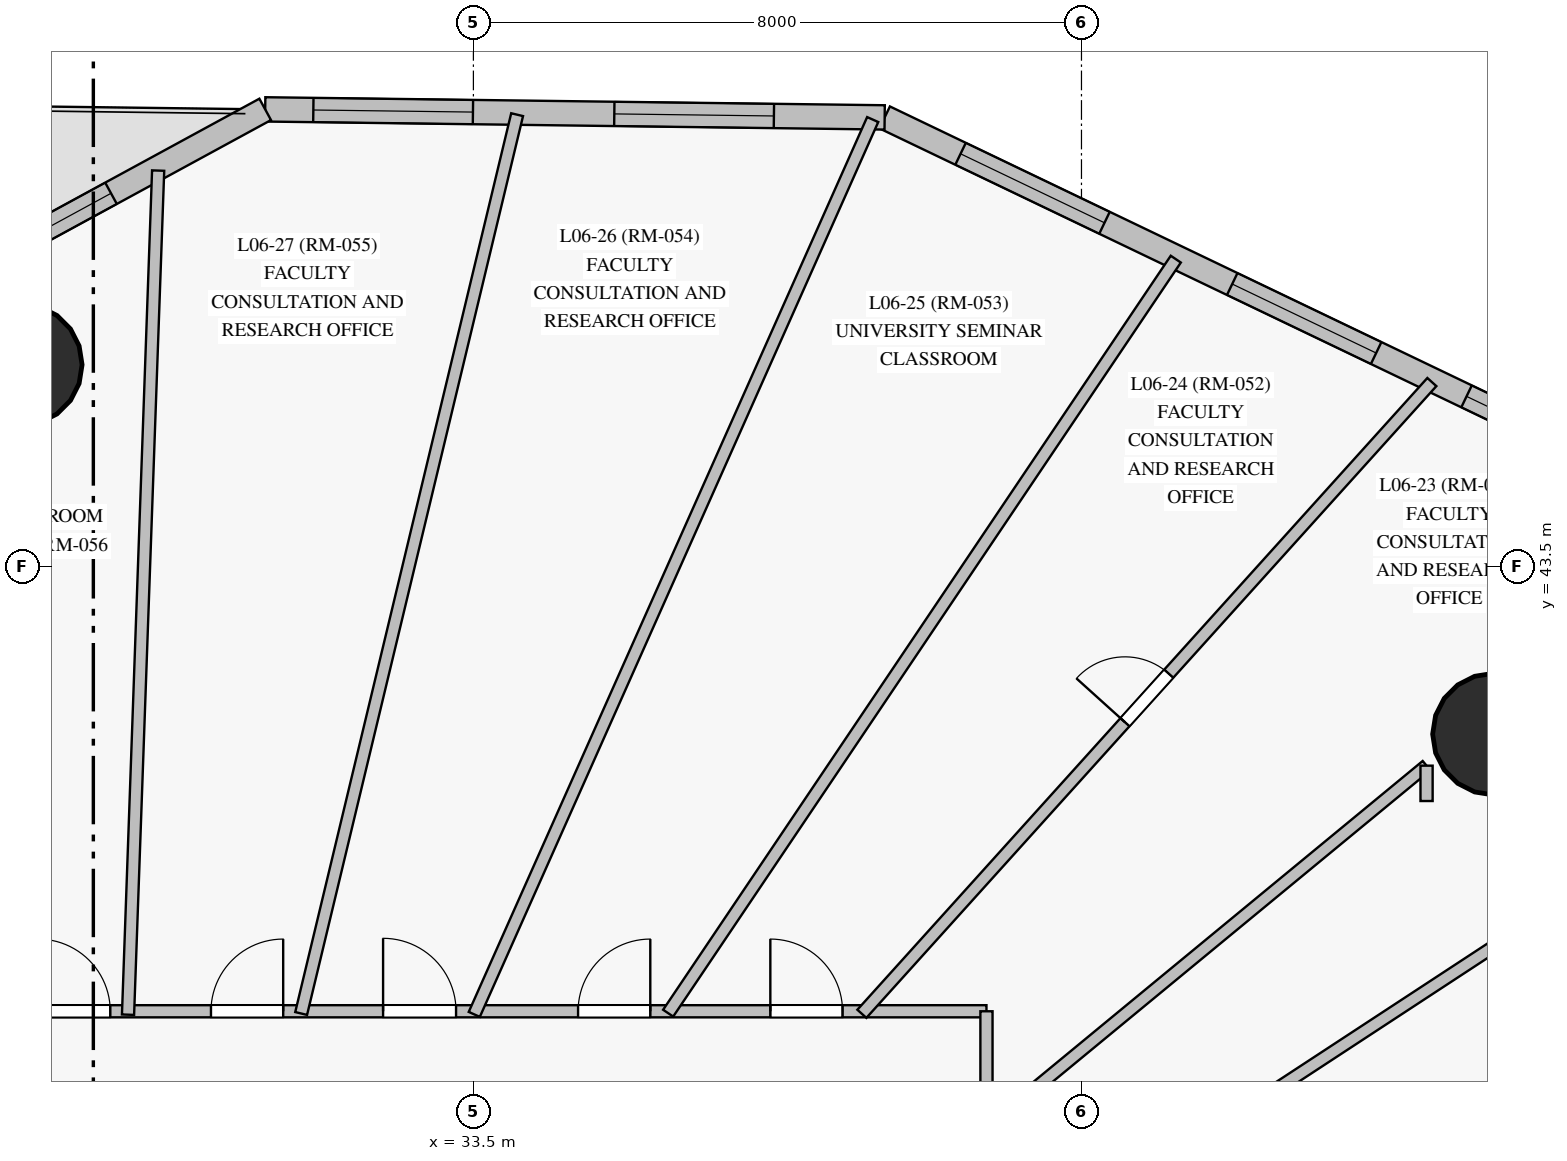
"""IFC4 building model, lengths in metres.
Left out: names, types, materials, properties, quantities, classifications, styles, units other than length and angle.
Written with IfcOpenShell. Run it as: python <this file> out.ifc"""

import sys

from ifc_helpers import new_model, si_unit, direction, frame, frame_2d, origin, origin_with_axes, origin_2d, place, context, subcontext, project, spatial, rectangle, circle, extrude, source, transform, mapped, element, fill, save


model = new_model("IFC4")
c1 = context("Model", 3, precision=1e-05, world=origin(), true_north=direction((0.0, 1.0)))
c2 = subcontext(c1, "Body", "Model", "MODEL_VIEW")
j1 = project(units=[si_unit("LENGTHUNIT", "METRE"), si_unit("PLANEANGLEUNIT", "RADIAN")], contexts=[c1])
p1 = place(None, origin())
s1 = spatial("IfcSite", under=j1, at=p1, CompositionType="ELEMENT")
p2 = place(p1, origin())
s2 = spatial("IfcBuilding", under=s1, at=p2, CompositionType="ELEMENT")
p3 = place(p2, frame((0.0, 0.0, 26.5)))
s3 = spatial("IfcBuildingStorey", under=s2, at=p3, CompositionType="ELEMENT", Elevation=26.5)
m1 = source(origin_with_axes(), c2, "Body", "SweptSolid", [
    extrude(circle(Radius=0.8, at=origin_2d()), origin(), (0.0, 0.0, 1.0), 3.6),
])
for number, where, z_axis, x_axis in (
    (1, (46.92, 41.296, 0.0), (0.0, 0.0, 1.0), (1.0, 0.0, 0.0)),
    (2, (27.552, 46.156, 0.0), (0.0, 0.0, 1.0), (1.0, 0.0, 0.0)),
):
    element("IfcColumn", number, at=place(p3, frame(where, z_axis=z_axis, x_axis=x_axis)), inside=s3, PredefinedType="COLUMN", context=c2, shape_type="MappedRepresentation", body=[
        mapped(m1, transform((0.0, 0.0, 0.0), scale=1.0)),
    ])
p4 = place(p3, frame((48.697, 44.718, 0.0), z_axis=(0.0, 0.0, 1.0), x_axis=(-0.901740587255, 0.432277588242, 0.0)))
e3 = element("IfcWall", 3, at=p4, inside=s3, PredefinedType="SOLIDWALL", context=c2, shape_type="SweptSolid", body=[
    extrude(rectangle(XDim=10.853, YDim=0.32, at=frame_2d((5.426, 0.0))), origin(), (0.0, 0.0, 1.0), 3.35),
])
p5 = place(p4, frame((0.563, 0.0, 0.85)))
e4 = element("IfcOpeningElement", 4, at=p5, cuts=e3, PredefinedType="OPENING", context=c2, shape_type="SweptSolid", body=[
    extrude(rectangle(XDim=1.8, YDim=1.85, at=frame_2d((0.9, 0.925))), frame((0.0, 0.17, 0.0), z_axis=(0.0, -1.0, 0.0), x_axis=(1.0, 0.0, 0.0)), (0.0, 0.0, 1.0), 0.34),
])
p6 = place(p4, frame((3.682, 0.0, 0.85)))
e5 = element("IfcOpeningElement", 5, at=p6, cuts=e3, PredefinedType="OPENING", context=c2, shape_type="SweptSolid", body=[
    extrude(rectangle(XDim=2.1, YDim=1.95, at=frame_2d((1.05, 0.975))), frame((0.0, 0.17, 0.0), z_axis=(0.0, -1.0, 0.0), x_axis=(1.0, 0.0, 0.0)), (0.0, 0.0, 1.0), 0.34),
])
p7 = place(p4, frame((7.645, 0.0, 0.85)))
e6 = element("IfcOpeningElement", 6, at=p7, cuts=e3, PredefinedType="OPENING", context=c2, shape_type="SweptSolid", body=[
    extrude(rectangle(XDim=2.1, YDim=1.95, at=frame_2d((1.05, 0.975))), frame((0.0, 0.17, 0.0), z_axis=(0.0, -1.0, 0.0), x_axis=(1.0, 0.0, 0.0)), (0.0, 0.0, 1.0), 0.34),
])
p8 = place(p3, frame((38.911, 49.41, 0.0), z_axis=(0.0, 0.0, 1.0), x_axis=(-0.999916274404, 0.012940022483, 0.0)))
e7 = element("IfcWall", 7, at=p8, inside=s3, PredefinedType="SOLIDWALL", context=c2, shape_type="SweptSolid", body=[
    extrude(rectangle(XDim=8.151, YDim=0.32, at=frame_2d((4.075, 0.0))), origin(), (0.0, 0.0, 1.0), 3.35),
])
p9 = place(p8, frame((1.457, 0.0, 0.85)))
e8 = element("IfcOpeningElement", 8, at=p9, cuts=e7, PredefinedType="OPENING", context=c2, shape_type="SweptSolid", body=[
    extrude(rectangle(XDim=2.1, YDim=1.95, at=frame_2d((1.05, 0.975))), frame((0.0, 0.17, 0.0), z_axis=(0.0, -1.0, 0.0), x_axis=(1.0, 0.0, 0.0)), (0.0, 0.0, 1.0), 0.34),
])
p10 = place(p8, frame((5.417, 0.0, 0.85)))
e9 = element("IfcOpeningElement", 9, at=p10, cuts=e7, PredefinedType="OPENING", context=c2, shape_type="SweptSolid", body=[
    extrude(rectangle(XDim=2.1, YDim=1.95, at=frame_2d((1.05, 0.975))), frame((0.0, 0.17, 0.0), z_axis=(0.0, -1.0, 0.0), x_axis=(1.0, 0.0, 0.0)), (0.0, 0.0, 1.0), 0.34),
])
p11 = place(p3, frame((30.761, 49.515, 0.0), z_axis=(0.0, 0.0, 1.0), x_axis=(-0.878317970129, -0.478076922, 0.0)))
e10 = element("IfcWall", 10, at=p11, inside=s3, PredefinedType="SOLIDWALL", context=c2, shape_type="SweptSolid", body=[
    extrude(rectangle(XDim=25.977, YDim=0.32, at=frame_2d((12.989, 0.0))), origin(), (0.0, 0.0, 1.0), 3.35),
])
p12 = place(p11, frame((2.309, 0.0, 0.85)))
e11 = element("IfcOpeningElement", 11, at=p12, cuts=e10, PredefinedType="OPENING", context=c2, shape_type="SweptSolid", body=[
    extrude(rectangle(XDim=2.1, YDim=1.95, at=frame_2d((1.05, 0.975))), frame((0.0, 0.17, 0.0), z_axis=(0.0, -1.0, 0.0), x_axis=(1.0, 0.0, 0.0)), (0.0, 0.0, 1.0), 0.34),
])
p13 = place(p11, frame((6.998, 0.0, 0.85)))
e12 = element("IfcOpeningElement", 12, at=p13, cuts=e10, PredefinedType="OPENING", context=c2, shape_type="SweptSolid", body=[
    extrude(rectangle(XDim=2.1, YDim=1.95, at=frame_2d((1.05, 0.975))), frame((0.0, 0.17, 0.0), z_axis=(0.0, -1.0, 0.0), x_axis=(1.0, 0.0, 0.0)), (0.0, 0.0, 1.0), 0.34),
])
p14 = place(p11, frame((22.154, 0.0, 0.85)))
e13 = element("IfcOpeningElement", 13, at=p14, cuts=e10, PredefinedType="OPENING", context=c2, shape_type="SweptSolid", body=[
    extrude(rectangle(XDim=2.1, YDim=1.95, at=frame_2d((1.05, 0.975))), frame((0.0, 0.17, 0.0), z_axis=(0.0, -1.0, 0.0), x_axis=(1.0, 0.0, 0.0)), (0.0, 0.0, 1.0), 0.34),
])
p15 = place(p11, frame((12.464, 0.0, 0.0)))
e14 = element("IfcOpeningElement", 14, at=p15, cuts=e10, PredefinedType="OPENING", context=c2, shape_type="SweptSolid", body=[
    extrude(rectangle(XDim=1.05, YDim=2.12, at=frame_2d((0.525, 1.06))), frame((0.0, 0.17, 0.0), z_axis=(0.0, -1.0, 0.0), x_axis=(1.0, 0.0, 0.0)), (0.0, 0.0, 1.0), 0.34),
])
p16 = place(p3, frame((10.5, 37.65, 0.0), z_axis=(0.0, 0.0, 1.0), x_axis=(1.0, 0.0, 0.0)))
e15 = element("IfcWall", 15, at=p16, inside=s3, PredefinedType="PARTITIONING", context=c2, shape_type="SweptSolid", body=[
    extrude(rectangle(XDim=29.75, YDim=0.16, at=frame_2d((14.875, 0.0))), origin(), (0.0, 0.0, 1.0), 2.75),
])
p17 = place(p16, frame((26.906, 0.0, 0.0)))
e16 = element("IfcOpeningElement", 16, at=p17, cuts=e15, PredefinedType="OPENING", context=c2, shape_type="SweptSolid", body=[
    extrude(rectangle(XDim=0.95, YDim=2.15, at=frame_2d((0.475, 1.075))), frame((0.0, 0.09, 0.0), z_axis=(0.0, -1.0, 0.0), x_axis=(1.0, 0.0, 0.0)), (0.0, 0.0, 1.0), 0.18),
])
p18 = place(p16, frame((24.377, 0.0, 0.0)))
e17 = element("IfcOpeningElement", 17, at=p18, cuts=e15, PredefinedType="OPENING", context=c2, shape_type="SweptSolid", body=[
    extrude(rectangle(XDim=0.95, YDim=2.15, at=frame_2d((0.475, 1.075))), frame((0.0, 0.09, 0.0), z_axis=(0.0, -1.0, 0.0), x_axis=(1.0, 0.0, 0.0)), (0.0, 0.0, 1.0), 0.18),
])
p19 = place(p16, frame((21.812, 0.0, 0.0)))
e18 = element("IfcOpeningElement", 18, at=p19, cuts=e15, PredefinedType="OPENING", context=c2, shape_type="SweptSolid", body=[
    extrude(rectangle(XDim=0.96, YDim=2.15, at=frame_2d((0.48, 1.075))), frame((0.0, 0.09, 0.0), z_axis=(0.0, -1.0, 0.0), x_axis=(1.0, 0.0, 0.0)), (0.0, 0.0, 1.0), 0.18),
])
p20 = place(p16, frame((19.548, 0.0, 0.0)))
e19 = element("IfcOpeningElement", 19, at=p20, cuts=e15, PredefinedType="OPENING", context=c2, shape_type="SweptSolid", body=[
    extrude(rectangle(XDim=0.95, YDim=2.15, at=frame_2d((0.475, 1.075))), frame((0.0, 0.09, 0.0), z_axis=(0.0, -1.0, 0.0), x_axis=(1.0, 0.0, 0.0)), (0.0, 0.0, 1.0), 0.18),
])
p21 = place(p16, frame((17.272, 0.0, 0.0)))
e20 = element("IfcOpeningElement", 20, at=p21, cuts=e15, PredefinedType="OPENING", context=c2, shape_type="SweptSolid", body=[
    extrude(rectangle(XDim=0.95, YDim=2.15, at=frame_2d((0.475, 1.075))), frame((0.0, 0.09, 0.0), z_axis=(0.0, -1.0, 0.0), x_axis=(1.0, 0.0, 0.0)), (0.0, 0.0, 1.0), 0.18),
])
p22 = place(p16, frame((15.625, 0.0, 0.0)))
e21 = element("IfcOpeningElement", 21, at=p22, cuts=e15, PredefinedType="OPENING", context=c2, shape_type="SweptSolid", body=[
    extrude(rectangle(XDim=0.96, YDim=2.15, at=frame_2d((0.48, 1.075))), frame((0.0, 0.09, 0.0), z_axis=(0.0, -1.0, 0.0), x_axis=(1.0, 0.0, 0.0)), (0.0, 0.0, 1.0), 0.18),
])
p23 = place(p16, frame((14.4, 0.0, 0.0)))
e22 = element("IfcOpeningElement", 22, at=p23, cuts=e15, PredefinedType="OPENING", context=c2, shape_type="SweptSolid", body=[
    extrude(rectangle(XDim=0.95, YDim=2.15, at=frame_2d((0.475, 1.075))), frame((0.0, 0.09, 0.0), z_axis=(0.0, -1.0, 0.0), x_axis=(1.0, 0.0, 0.0)), (0.0, 0.0, 1.0), 0.18),
])
p24 = place(p16, frame((9.938, 0.0, 0.0)))
e23 = element("IfcOpeningElement", 23, at=p24, cuts=e15, PredefinedType="OPENING", context=c2, shape_type="SweptSolid", body=[
    extrude(rectangle(XDim=0.95, YDim=2.15, at=frame_2d((0.475, 1.075))), frame((0.0, 0.09, 0.0), z_axis=(0.0, -1.0, 0.0), x_axis=(1.0, 0.0, 0.0)), (0.0, 0.0, 1.0), 0.18),
])
p25 = place(p3, frame((40.25, 37.65, 0.0), z_axis=(0.0, 0.0, 1.0), x_axis=(0.0, -1.0, 0.0)))
e24 = element("IfcWall", 24, at=p25, inside=s3, PredefinedType="PARTITIONING", context=c2, shape_type="SweptSolid", body=[
    extrude(rectangle(XDim=22.3, YDim=0.16, at=frame_2d((11.15, 0.0))), origin(), (0.0, 0.0, 1.0), 2.75),
])
p26 = place(p25, frame((16.25, 0.0, 0.0)))
e25 = element("IfcOpeningElement", 25, at=p26, cuts=e24, PredefinedType="OPENING", context=c2, shape_type="SweptSolid", body=[
    extrude(rectangle(XDim=0.96, YDim=2.15, at=frame_2d((0.48, 1.075))), frame((0.0, 0.09, 0.0), z_axis=(0.0, -1.0, 0.0), x_axis=(1.0, 0.0, 0.0)), (0.0, 0.0, 1.0), 0.18),
])
p27 = place(p25, frame((14.02, 0.0, 0.0)))
e26 = element("IfcOpeningElement", 26, at=p27, cuts=e24, PredefinedType="OPENING", context=c2, shape_type="SweptSolid", body=[
    extrude(rectangle(XDim=0.95, YDim=2.15, at=frame_2d((0.475, 1.075))), frame((0.0, 0.09, 0.0), z_axis=(0.0, -1.0, 0.0), x_axis=(1.0, 0.0, 0.0)), (0.0, 0.0, 1.0), 0.18),
])
p28 = place(p25, frame((12.052, 0.0, 0.0)))
e27 = element("IfcOpeningElement", 27, at=p28, cuts=e24, PredefinedType="OPENING", context=c2, shape_type="SweptSolid", body=[
    extrude(rectangle(XDim=0.95, YDim=2.15, at=frame_2d((0.475, 1.075))), frame((0.0, 0.09, 0.0), z_axis=(0.0, -1.0, 0.0), x_axis=(1.0, 0.0, 0.0)), (0.0, 0.0, 1.0), 0.18),
])
p29 = place(p25, frame((4.235, 0.0, 0.0)))
e28 = element("IfcOpeningElement", 28, at=p29, cuts=e24, PredefinedType="OPENING", context=c2, shape_type="SweptSolid", body=[
    extrude(rectangle(XDim=0.96, YDim=2.15, at=frame_2d((0.48, 1.075))), frame((0.0, 0.09, 0.0), z_axis=(0.0, -1.0, 0.0), x_axis=(1.0, 0.0, 0.0)), (0.0, 0.0, 1.0), 0.18),
])
p30 = place(p25, frame((10.45, 0.0, 0.0)))
e29 = element("IfcOpeningElement", 29, at=p30, cuts=e24, PredefinedType="OPENING", context=c2, shape_type="SweptSolid", body=[
    extrude(rectangle(XDim=0.86, YDim=2.1, at=frame_2d((0.43, 1.05))), frame((0.0, 0.09, 0.0), z_axis=(0.0, -1.0, 0.0), x_axis=(1.0, 0.0, 0.0)), (0.0, 0.0, 1.0), 0.18),
])
p31 = place(p25, frame((1.94, 0.0, 0.0)))
e30 = element("IfcOpeningElement", 30, at=p31, cuts=e24, PredefinedType="OPENING", context=c2, shape_type="SweptSolid", body=[
    extrude(rectangle(XDim=0.96, YDim=2.15, at=frame_2d((0.48, 1.075))), frame((0.0, 0.09, 0.0), z_axis=(0.0, -1.0, 0.0), x_axis=(1.0, 0.0, 0.0)), (0.0, 0.0, 1.0), 0.18),
])
p32 = place(p25, frame((17.39, 0.0, 0.0)))
e31 = element("IfcOpeningElement", 31, at=p32, cuts=e24, PredefinedType="OPENING", context=c2, shape_type="SweptSolid", body=[
    extrude(rectangle(XDim=0.95, YDim=2.15, at=frame_2d((0.475, 1.075))), frame((0.0, 0.09, 0.0), z_axis=(0.0, -1.0, 0.0), x_axis=(1.0, 0.0, 0.0)), (0.0, 0.0, 1.0), 0.18),
])
p33 = place(p25, frame((18.522, 0.0, 0.0)))
e32 = element("IfcOpeningElement", 32, at=p33, cuts=e24, PredefinedType="OPENING", context=c2, shape_type="SweptSolid", body=[
    extrude(rectangle(XDim=0.95, YDim=2.15, at=frame_2d((0.475, 1.075))), frame((0.0, 0.09, 0.0), z_axis=(0.0, -1.0, 0.0), x_axis=(1.0, 0.0, 0.0)), (0.0, 0.0, 1.0), 0.18),
])
p34 = place(p25, frame((8.331, 0.0, 0.0)))
e33 = element("IfcOpeningElement", 33, at=p34, cuts=e24, PredefinedType="OPENING", context=c2, shape_type="SweptSolid", body=[
    extrude(rectangle(XDim=0.86, YDim=2.04, at=frame_2d((0.43, 1.02))), frame((0.0, 0.09, 0.0), z_axis=(0.0, -1.0, 0.0), x_axis=(1.0, 0.0, 0.0)), (0.0, 0.0, 1.0), 0.18),
])
p35 = place(p25, frame((6.992, 0.0, 0.0)))
e34 = element("IfcOpeningElement", 34, at=p35, cuts=e24, PredefinedType="OPENING", context=c2, shape_type="SweptSolid", body=[
    extrude(rectangle(XDim=0.86, YDim=2.04, at=frame_2d((0.43, 1.02))), frame((0.0, 0.09, 0.0), z_axis=(0.0, -1.0, 0.0), x_axis=(1.0, 0.0, 0.0)), (0.0, 0.0, 1.0), 0.18),
])
p36 = place(p3, frame((40.223, 32.021, 0.0), z_axis=(0.0, 0.0, 1.0), x_axis=(0.902690033132, 0.430291417629, 0.0)))
e35 = element("IfcWall", 35, at=p36, inside=s3, PredefinedType="PARTITIONING", context=c2, shape_type="SweptSolid", body=[
    extrude(rectangle(XDim=14.379, YDim=0.16, at=frame_2d((7.189, 0.0))), origin(), (0.0, 0.0, 1.0), 3.35),
])
p37 = place(p36, frame((6.76, 0.0, 0.0)))
e36 = element("IfcOpeningElement", 36, at=p37, cuts=e35, PredefinedType="OPENING", context=c2, shape_type="SweptSolid", body=[
    extrude(rectangle(XDim=0.86, YDim=2.04, at=frame_2d((0.43, 1.02))), frame((0.0, 0.09, 0.0), z_axis=(0.0, -1.0, 0.0), x_axis=(1.0, 0.0, 0.0)), (0.0, 0.0, 1.0), 0.18),
])
p38 = place(p3, frame((40.225, 34.111, 0.0), z_axis=(0.0, 0.0, 1.0), x_axis=(0.836442719116, 0.548054356463, 0.0)))
e37 = element("IfcWall", 37, at=p38, inside=s3, PredefinedType="PARTITIONING", context=c2, shape_type="SweptSolid", body=[
    extrude(rectangle(XDim=12.997, YDim=0.16, at=frame_2d((6.498, 0.0))), origin(), (0.0, 0.0, 1.0), 3.35),
])
p39 = place(p3, frame((33.512, 37.609, 0.0), z_axis=(0.0, 0.0, 1.0), x_axis=(0.406737794038, 0.9135449452, 0.0)))
e38 = element("IfcWall", 38, at=p39, inside=s3, PredefinedType="PARTITIONING", context=c2, shape_type="SweptSolid", body=[
    extrude(rectangle(XDim=12.886, YDim=0.16, at=frame_2d((6.443, 0.0))), origin(), (0.0, 0.0, 1.0), 3.35),
])
p40 = place(p3, frame((31.234, 37.621, 0.0), z_axis=(0.0, 0.0, 1.0), x_axis=(0.233635653237, 0.972324216266, 0.0)))
e39 = element("IfcWall", 39, at=p40, inside=s3, PredefinedType="PARTITIONING", context=c2, shape_type="SweptSolid", body=[
    extrude(rectangle(XDim=12.161, YDim=0.16, at=frame_2d((6.081, 0.0))), origin(), (0.0, 0.0, 1.0), 3.35),
])
p41 = place(p3, frame((36.062, 37.625, 0.0), z_axis=(0.0, 0.0, 1.0), x_axis=(0.558468232685, 0.829525908626, 0.0)))
e40 = element("IfcWall", 40, at=p41, inside=s3, PredefinedType="PARTITIONING", context=c2, shape_type="SweptSolid", body=[
    extrude(rectangle(XDim=11.958, YDim=0.16, at=frame_2d((5.979, 0.0))), origin(), (0.0, 0.0, 1.0), 3.35),
])
p42 = place(p3, frame((38.611, 37.617, 0.0), z_axis=(0.0, 0.0, 1.0), x_axis=(0.669895621774, 0.742455288841, 0.0)))
e41 = element("IfcWall", 41, at=p42, inside=s3, PredefinedType="PARTITIONING", context=c2, shape_type="SweptSolid", body=[
    extrude(rectangle(XDim=11.194, YDim=0.16, at=frame_2d((5.597, 0.0))), origin(), (0.0, 0.0, 1.0), 3.35),
])
p43 = place(p42, frame((5.167, 0.0, 0.0)))
e42 = element("IfcOpeningElement", 42, at=p43, cuts=e41, PredefinedType="OPENING", context=c2, shape_type="SweptSolid", body=[
    extrude(rectangle(XDim=0.86, YDim=2.04, at=frame_2d((0.43, 1.02))), frame((0.0, 0.09, 0.0), z_axis=(0.0, -1.0, 0.0), x_axis=(1.0, 0.0, 0.0)), (0.0, 0.0, 1.0), 0.18),
])
p44 = place(p3, frame((28.956, 37.605, 0.0), z_axis=(0.0, 0.0, 1.0), x_axis=(0.035658616268, 0.999364029314, 0.0)))
e43 = element("IfcWall", 43, at=p44, inside=s3, PredefinedType="PARTITIONING", context=c2, shape_type="SweptSolid", body=[
    extrude(rectangle(XDim=11.112, YDim=0.16, at=frame_2d((5.556, 0.0))), origin(), (0.0, 0.0, 1.0), 3.35),
])
p45 = place(p3, frame((40.227, 36.089, 0.0), z_axis=(0.0, 0.0, 1.0), x_axis=(0.771628936431, 0.636072939577, 0.0)))
e44 = element("IfcWall", 44, at=p45, inside=s3, PredefinedType="PARTITIONING", context=c2, shape_type="SweptSolid", body=[
    extrude(rectangle(XDim=7.534, YDim=0.16, at=frame_2d((3.767, 0.0))), origin(), (0.0, 0.0, 1.0), 2.7),
])
p46 = place(p3, frame((46.04, 40.881, 0.0), z_axis=(0.0, 0.0, 1.0), x_axis=(0.0, -1.0, 0.0)))
e45 = element("IfcWall", 45, at=p46, inside=s3, PredefinedType="PARTITIONING", context=c2, shape_type="SweptSolid", body=[
    extrude(rectangle(XDim=0.465, YDim=0.16, at=frame_2d((0.232, 0.0))), origin(), (0.0, 0.0, 1.0), 3.35),
])
m2 = source(origin_with_axes(), c2, "Body", "SweptSolid", [
    extrude(rectangle(XDim=1.8, YDim=1.85, at=frame_2d((0.9, 0.925))), frame((0.0, 0.03, 0.0), z_axis=(0.0, -1.0, 0.0), x_axis=(1.0, 0.0, 0.0)), (0.0, 0.0, 1.0), 0.06),
])
p47 = place(p5, origin())
e46 = element("IfcWindow", 46, at=p47, inside=s3, PartitioningType="SINGLE_PANEL", PredefinedType="WINDOW", context=c2, shape_type="MappedRepresentation", body=[
    mapped(m2, transform((0.0, 0.0, 0.0), scale=1.0)),
])
fill(e4, e46)
m3 = source(origin_with_axes(), c2, "Body", "SweptSolid", [
    extrude(rectangle(XDim=2.1, YDim=1.95, at=frame_2d((1.05, 0.975))), frame((0.0, 0.03, 0.0), z_axis=(0.0, -1.0, 0.0), x_axis=(1.0, 0.0, 0.0)), (0.0, 0.0, 1.0), 0.06),
])
p48 = place(p6, origin())
e47 = element("IfcWindow", 47, at=p48, inside=s3, PartitioningType="SINGLE_PANEL", PredefinedType="WINDOW", context=c2, shape_type="MappedRepresentation", body=[
    mapped(m3, transform((0.0, 0.0, 0.0), scale=1.0)),
])
fill(e5, e47)
p49 = place(p7, origin())
e48 = element("IfcWindow", 48, at=p49, inside=s3, PartitioningType="SINGLE_PANEL", PredefinedType="WINDOW", context=c2, shape_type="MappedRepresentation", body=[
    mapped(m3, transform((0.0, 0.0, 0.0), scale=1.0)),
])
fill(e6, e48)
p50 = place(p9, origin())
e49 = element("IfcWindow", 49, at=p50, inside=s3, PartitioningType="SINGLE_PANEL", PredefinedType="WINDOW", context=c2, shape_type="MappedRepresentation", body=[
    mapped(m3, transform((0.0, 0.0, 0.0), scale=1.0)),
])
fill(e8, e49)
p51 = place(p10, origin())
e50 = element("IfcWindow", 50, at=p51, inside=s3, PartitioningType="SINGLE_PANEL", PredefinedType="WINDOW", context=c2, shape_type="MappedRepresentation", body=[
    mapped(m3, transform((0.0, 0.0, 0.0), scale=1.0)),
])
fill(e9, e50)
p52 = place(p12, origin())
e51 = element("IfcWindow", 51, at=p52, inside=s3, PartitioningType="SINGLE_PANEL", PredefinedType="WINDOW", context=c2, shape_type="MappedRepresentation", body=[
    mapped(m3, transform((0.0, 0.0, 0.0), scale=1.0)),
])
fill(e11, e51)
m4 = source(origin_with_axes(), c2, "Body", "SweptSolid", [
    extrude(rectangle(XDim=0.95, YDim=2.15, at=frame_2d((0.475, 1.075))), frame((0.0, 0.025, 0.0), z_axis=(0.0, -1.0, 0.0), x_axis=(1.0, 0.0, 0.0)), (0.0, 0.0, 1.0), 0.05),
])
p53 = place(p17, origin())
e52 = element("IfcDoor", 52, at=p53, inside=s3, OperationType="SINGLE_SWING_LEFT", PredefinedType="DOOR", context=c2, shape_type="MappedRepresentation", body=[
    mapped(m4, transform((0.0, 0.0, 0.0), scale=1.0)),
])
fill(e16, e52)
p54 = place(p18, origin())
e53 = element("IfcDoor", 53, at=p54, inside=s3, OperationType="SINGLE_SWING_RIGHT", PredefinedType="DOOR", context=c2, shape_type="MappedRepresentation", body=[
    mapped(m4, transform((0.0, 0.0, 0.0), scale=1.0)),
])
fill(e17, e53)
m5 = source(origin_with_axes(), c2, "Body", "SweptSolid", [
    extrude(rectangle(XDim=0.96, YDim=2.15, at=frame_2d((0.48, 1.075))), frame((0.0, 0.025, 0.0), z_axis=(0.0, -1.0, 0.0), x_axis=(1.0, 0.0, 0.0)), (0.0, 0.0, 1.0), 0.05),
])
p55 = place(p19, origin())
e54 = element("IfcDoor", 54, at=p55, inside=s3, OperationType="SINGLE_SWING_LEFT", PredefinedType="DOOR", context=c2, shape_type="MappedRepresentation", body=[
    mapped(m5, transform((0.0, 0.0, 0.0), scale=1.0)),
])
fill(e18, e54)
p56 = place(p20, origin())
e55 = element("IfcDoor", 55, at=p56, inside=s3, OperationType="SINGLE_SWING_RIGHT", PredefinedType="DOOR", context=c2, shape_type="MappedRepresentation", body=[
    mapped(m4, transform((0.0, 0.0, 0.0), scale=1.0)),
])
fill(e19, e55)
p57 = place(p21, origin())
e56 = element("IfcDoor", 56, at=p57, inside=s3, OperationType="SINGLE_SWING_LEFT", PredefinedType="DOOR", context=c2, shape_type="MappedRepresentation", body=[
    mapped(m4, transform((0.0, 0.0, 0.0), scale=1.0)),
])
fill(e20, e56)
m6 = source(origin_with_axes(), c2, "Body", "SweptSolid", [
    extrude(rectangle(XDim=0.86, YDim=2.04, at=frame_2d((0.43, 1.02))), frame((0.0, 0.025, 0.0), z_axis=(0.0, -1.0, 0.0), x_axis=(1.0, 0.0, 0.0)), (0.0, 0.0, 1.0), 0.05),
])
p58 = place(p43, origin())
e57 = element("IfcDoor", 57, at=p58, inside=s3, OperationType="SINGLE_SWING_LEFT", PredefinedType="DOOR", context=c2, shape_type="MappedRepresentation", body=[
    mapped(m6, transform((0.0, 0.0, 0.0), scale=1.0)),
])
fill(e42, e57)
save(model, sys.argv[1])
